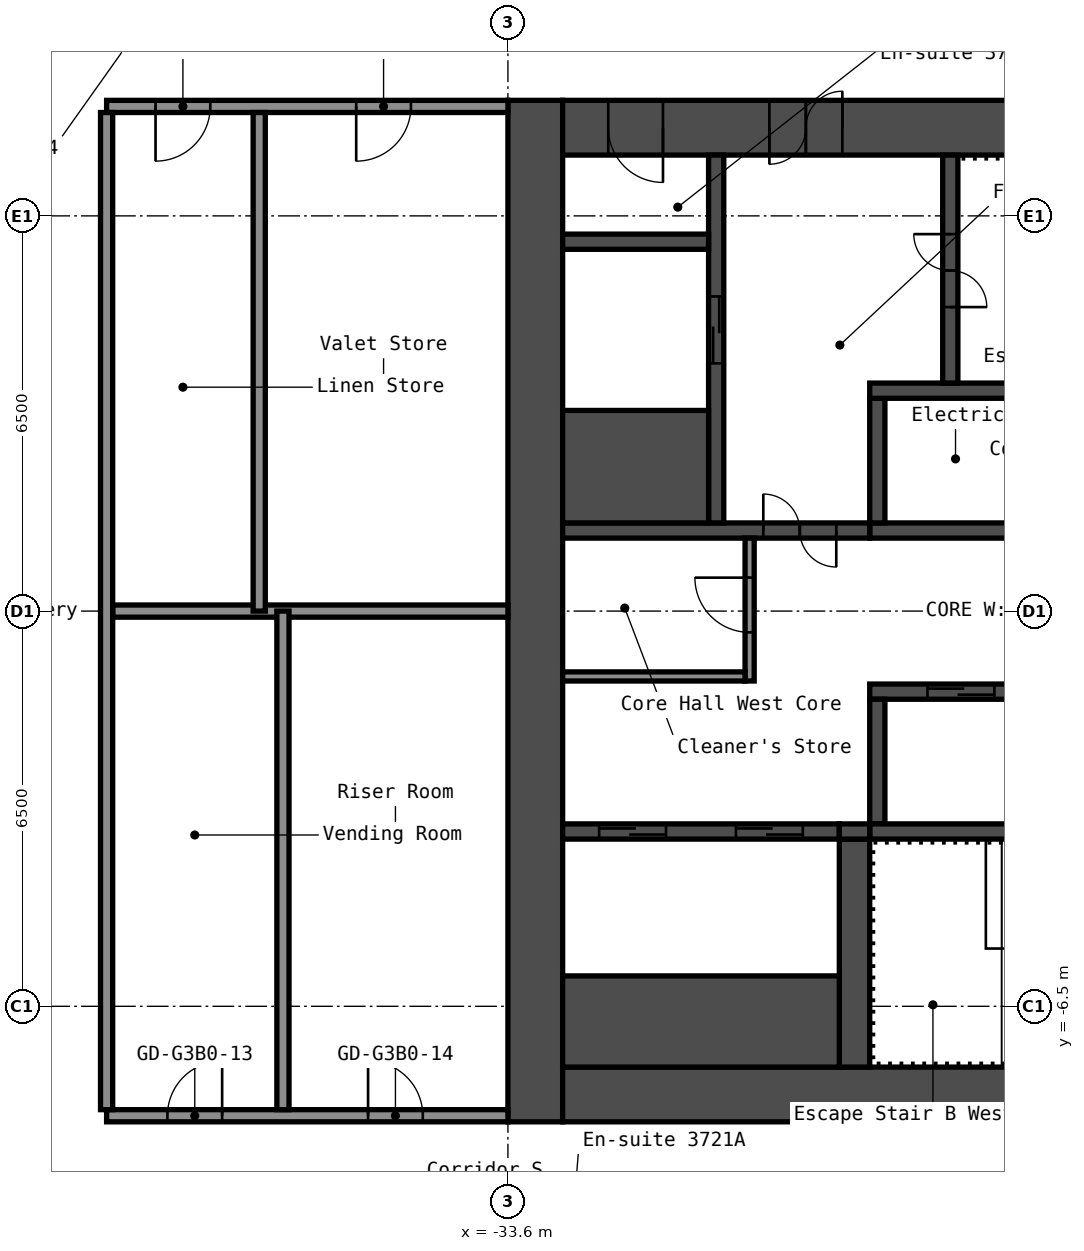
"""IFC4 building model, lengths in metres.
Left out: names, types, materials, properties, quantities, classifications, styles, units other than length and angle.
Written with IfcOpenShell. Run it as: python <this file> out.ifc"""

import sys

from ifc_helpers import new_model, si_unit, direction, frame, frame_2d, origin, place, context, subcontext, project, spatial, rectangle, extrude, element, fill, save


model = new_model("IFC4")
c1 = context("Model", 3, precision=1e-05, world=origin(), true_north=direction((0.0, 1.0)))
c2 = subcontext(c1, "Body", "Model", "MODEL_VIEW")
j1 = project(units=[si_unit("LENGTHUNIT", "METRE"), si_unit("PLANEANGLEUNIT", "RADIAN")], contexts=[c1])
p1 = place(None, origin())
s1 = spatial("IfcSite", under=j1, at=p1, CompositionType="ELEMENT")
p2 = place(p1, origin())
s2 = spatial("IfcBuilding", under=s1, at=p2, CompositionType="ELEMENT")
p3 = place(p2, frame((0.0, 0.0, 134.2)))
s3 = spatial("IfcBuildingStorey", under=s2, at=p3, CompositionType="ELEMENT", Elevation=134.2)
p4 = place(p3, frame((-33.15, -8.4, 0.0), z_axis=(0.0, 0.0, 1.0), x_axis=(0.0, 1.0, 0.0)))
e1 = element("IfcWall", 1, at=p4, inside=s3, PredefinedType="SHEAR", context=c2, shape_type="SweptSolid", body=[
    extrude(rectangle(XDim=16.8, YDim=0.9, at=frame_2d((8.4, 0.0))), origin(), (0.0, 0.0, 1.0), 2.75),
])
p5 = place(p3, frame((-32.7, 7.95, 0.0), z_axis=(0.0, 0.0, 1.0), x_axis=(1.0, 0.0, 0.0)))
e2 = element("IfcWall", 2, at=p5, inside=s3, PredefinedType="SHEAR", context=c2, shape_type="SweptSolid", body=[
    extrude(rectangle(XDim=15.0, YDim=0.9, at=frame_2d((7.5, 0.0))), origin(), (0.0, 0.0, 1.0), 2.75),
])
p6 = place(p5, frame((3.4, 0.0, 0.0)))
e3 = element("IfcOpeningElement", 3, at=p6, cuts=e2, PredefinedType="OPENING", context=c2, shape_type="SweptSolid", body=[
    extrude(rectangle(XDim=1.2, YDim=2.1, at=frame_2d((0.6, 1.05))), frame((0.0, 0.46, 0.0), z_axis=(0.0, -1.0, 0.0), x_axis=(1.0, 0.0, 0.0)), (0.0, 0.0, 1.0), 0.92),
])
p7 = place(p5, frame((0.75, 0.0, 0.0)))
e4 = element("IfcOpeningElement", 4, at=p7, cuts=e2, PredefinedType="OPENING", context=c2, shape_type="SweptSolid", body=[
    extrude(rectangle(XDim=0.9, YDim=2.1, at=frame_2d((0.45, 1.05))), frame((0.0, 0.46, 0.0), z_axis=(0.0, -1.0, 0.0), x_axis=(1.0, 0.0, 0.0)), (0.0, 0.0, 1.0), 0.92),
])
p8 = place(p3, frame((-32.7, -7.95, 0.0), z_axis=(0.0, 0.0, 1.0), x_axis=(1.0, 0.0, 0.0)))
e5 = element("IfcWall", 5, at=p8, inside=s3, PredefinedType="SHEAR", context=c2, shape_type="SweptSolid", body=[
    extrude(rectangle(XDim=15.0, YDim=0.9, at=frame_2d((7.5, 0.0))), origin(), (0.0, 0.0, 1.0), 2.75),
])
p9 = place(p8, frame((11.45, 0.0, 0.0)))
e6 = element("IfcOpeningElement", 6, at=p9, cuts=e5, PredefinedType="OPENING", context=c2, shape_type="SweptSolid", body=[
    extrude(rectangle(XDim=1.0, YDim=2.1, at=frame_2d((0.5, 1.05))), frame((0.0, 0.46, 0.0), z_axis=(0.0, -1.0, 0.0), x_axis=(1.0, 0.0, 0.0)), (0.0, 0.0, 1.0), 0.92),
])
p10 = place(p3, frame((-27.65, 1.325, 0.0), z_axis=(0.0, 0.0, 1.0), x_axis=(1.0, 0.0, 0.0)))
e7 = element("IfcWall", 7, at=p10, inside=s3, PredefinedType="SHEAR", context=c2, shape_type="SweptSolid", body=[
    extrude(rectangle(XDim=7.5, YDim=0.25, at=frame_2d((3.75, 0.0))), origin(), (0.0, 0.0, 1.0), 2.75),
])
p11 = place(p10, frame((3.425, 0.0, 0.0)))
e8 = element("IfcOpeningElement", 8, at=p11, cuts=e7, PredefinedType="OPENING", context=c2, shape_type="SweptSolid", body=[
    extrude(rectangle(XDim=0.9, YDim=2.1, at=frame_2d((0.45, 1.05))), frame((0.0, 0.135, 0.0), z_axis=(0.0, -1.0, 0.0), x_axis=(1.0, 0.0, 0.0)), (0.0, 0.0, 1.0), 0.27),
])
p12 = place(p3, frame((-27.525, 1.45, 0.0), z_axis=(0.0, 0.0, 1.0), x_axis=(0.0, 1.0, 0.0)))
e9 = element("IfcWall", 9, at=p12, inside=s3, PredefinedType="SHEAR", context=c2, shape_type="SweptSolid", body=[
    extrude(rectangle(XDim=2.05, YDim=0.25, at=frame_2d((1.025, 0.0))), origin(), (0.0, 0.0, 1.0), 2.75),
])
p13 = place(p3, frame((-27.65, 3.625, 0.0), z_axis=(0.0, 0.0, 1.0), x_axis=(1.0, 0.0, 0.0)))
e10 = element("IfcWall", 10, at=p13, inside=s3, PredefinedType="SHEAR", context=c2, shape_type="SweptSolid", body=[
    extrude(rectangle(XDim=7.5, YDim=0.25, at=frame_2d((3.75, 0.0))), origin(), (0.0, 0.0, 1.0), 2.75),
])
p14 = place(p3, frame((-26.325, 3.75, 0.0), z_axis=(0.0, 0.0, 1.0), x_axis=(0.0, 1.0, 0.0)))
e11 = element("IfcWall", 11, at=p14, inside=s3, PredefinedType="SHEAR", context=c2, shape_type="SweptSolid", body=[
    extrude(rectangle(XDim=3.75, YDim=0.25, at=frame_2d((1.875, 0.0))), origin(), (0.0, 0.0, 1.0), 2.75),
])
p15 = place(p14, frame((1.25, 0.0, 0.0)))
e12 = element("IfcOpeningElement", 12, at=p15, cuts=e11, PredefinedType="OPENING", context=c2, shape_type="SweptSolid", body=[
    extrude(rectangle(XDim=1.2, YDim=2.1, at=frame_2d((0.6, 1.05))), frame((0.0, 0.135, 0.0), z_axis=(0.0, -1.0, 0.0), x_axis=(1.0, 0.0, 0.0)), (0.0, 0.0, 1.0), 0.27),
])
p16 = place(p3, frame((-32.7, 1.325, 0.0), z_axis=(0.0, 0.0, 1.0), x_axis=(1.0, 0.0, 0.0)))
e13 = element("IfcWall", 13, at=p16, inside=s3, PredefinedType="SHEAR", context=c2, shape_type="SweptSolid", body=[
    extrude(rectangle(XDim=5.05, YDim=0.25, at=frame_2d((2.525, 0.0))), origin(), (0.0, 0.0, 1.0), 2.75),
])
p17 = place(p16, frame((3.3, 0.0, 0.0)))
e14 = element("IfcOpeningElement", 14, at=p17, cuts=e13, PredefinedType="OPENING", context=c2, shape_type="SweptSolid", body=[
    extrude(rectangle(XDim=1.2, YDim=2.1, at=frame_2d((0.6, 1.05))), frame((0.0, 0.135, 0.0), z_axis=(0.0, -1.0, 0.0), x_axis=(1.0, 0.0, 0.0)), (0.0, 0.0, 1.0), 0.27),
])
p18 = place(p3, frame((-30.175, 1.45, 0.0), z_axis=(0.0, 0.0, 1.0), x_axis=(0.0, 1.0, 0.0)))
e15 = element("IfcWall", 15, at=p18, inside=s3, PredefinedType="SHEAR", context=c2, shape_type="SweptSolid", body=[
    extrude(rectangle(XDim=6.05, YDim=0.25, at=frame_2d((3.025, 0.0))), origin(), (0.0, 0.0, 1.0), 2.75),
])
p19 = place(p18, frame((2.625, 0.0, 0.0)))
e16 = element("IfcOpeningElement", 16, at=p19, cuts=e15, PredefinedType="OPENING", context=c2, shape_type="SweptSolid", body=[
    extrude(rectangle(XDim=1.1, YDim=2.1, at=frame_2d((0.55, 1.05))), frame((0.0, 0.135, 0.0), z_axis=(0.0, -1.0, 0.0), x_axis=(1.0, 0.0, 0.0)), (0.0, 0.0, 1.0), 0.27),
])
p20 = place(p3, frame((-32.7, 2.375, 0.0), z_axis=(0.0, 0.0, 1.0), x_axis=(1.0, 0.0, 0.0)))
e17 = element("IfcWall", 17, at=p20, inside=s3, PredefinedType="SHEAR", context=c2, shape_type="SweptSolid", body=[
    extrude(rectangle(XDim=2.4, YDim=1.85, at=frame_2d((1.2, 0.0))), origin(), (0.0, 0.0, 1.0), 2.75),
])
p21 = place(p3, frame((-32.7, 6.075, 0.0), z_axis=(0.0, 0.0, 1.0), x_axis=(1.0, 0.0, 0.0)))
e18 = element("IfcWall", 18, at=p21, inside=s3, PredefinedType="SHEAR", context=c2, shape_type="SweptSolid", body=[
    extrude(rectangle(XDim=2.4, YDim=0.25, at=frame_2d((1.2, 0.0))), origin(), (0.0, 0.0, 1.0), 2.75),
])
p22 = place(p3, frame((-27.65, -1.325, 0.0), z_axis=(0.0, 0.0, 1.0), x_axis=(1.0, 0.0, 0.0)))
e19 = element("IfcWall", 19, at=p22, inside=s3, PredefinedType="SHEAR", context=c2, shape_type="SweptSolid", body=[
    extrude(rectangle(XDim=7.5, YDim=0.25, at=frame_2d((3.75, 0.0))), origin(), (0.0, 0.0, 1.0), 2.75),
])
p23 = place(p22, frame((5.75, 0.0, 0.0)))
e20 = element("IfcOpeningElement", 20, at=p23, cuts=e19, PredefinedType="OPENING", context=c2, shape_type="SweptSolid", body=[
    extrude(rectangle(XDim=1.1, YDim=2.1, at=frame_2d((0.55, 1.05))), frame((0.0, 0.135, 0.0), z_axis=(0.0, -1.0, 0.0), x_axis=(1.0, 0.0, 0.0)), (0.0, 0.0, 1.0), 0.27),
])
p24 = place(p22, frame((3.35, 0.0, 0.0)))
e21 = element("IfcOpeningElement", 21, at=p24, cuts=e19, PredefinedType="OPENING", context=c2, shape_type="SweptSolid", body=[
    extrude(rectangle(XDim=1.1, YDim=2.1, at=frame_2d((0.55, 1.05))), frame((0.0, 0.135, 0.0), z_axis=(0.0, -1.0, 0.0), x_axis=(1.0, 0.0, 0.0)), (0.0, 0.0, 1.0), 0.27),
])
p25 = place(p22, frame((0.95, 0.0, 0.0)))
e22 = element("IfcOpeningElement", 22, at=p25, cuts=e19, PredefinedType="OPENING", context=c2, shape_type="SweptSolid", body=[
    extrude(rectangle(XDim=1.1, YDim=2.1, at=frame_2d((0.55, 1.05))), frame((0.0, 0.135, 0.0), z_axis=(0.0, -1.0, 0.0), x_axis=(1.0, 0.0, 0.0)), (0.0, 0.0, 1.0), 0.27),
])
p26 = place(p3, frame((-27.525, -3.5, 0.0), z_axis=(0.0, 0.0, 1.0), x_axis=(0.0, 1.0, 0.0)))
e23 = element("IfcWall", 23, at=p26, inside=s3, PredefinedType="SHEAR", context=c2, shape_type="SweptSolid", body=[
    extrude(rectangle(XDim=2.05, YDim=0.25, at=frame_2d((1.025, 0.0))), origin(), (0.0, 0.0, 1.0), 2.75),
])
p27 = place(p3, frame((-27.65, -3.625, 0.0), z_axis=(0.0, 0.0, 1.0), x_axis=(1.0, 0.0, 0.0)))
e24 = element("IfcWall", 24, at=p27, inside=s3, PredefinedType="SHEAR", context=c2, shape_type="SweptSolid", body=[
    extrude(rectangle(XDim=7.5, YDim=0.25, at=frame_2d((3.75, 0.0))), origin(), (0.0, 0.0, 1.0), 2.75),
])
p28 = place(p3, frame((-27.9, -7.5, 0.0), z_axis=(0.0, 0.0, 1.0), x_axis=(0.0, 1.0, 0.0)))
e25 = element("IfcWall", 25, at=p28, inside=s3, PredefinedType="SHEAR", context=c2, shape_type="SweptSolid", body=[
    extrude(rectangle(XDim=3.75, YDim=0.5, at=frame_2d((1.875, 0.0))), origin(), (0.0, 0.0, 1.0), 2.75),
])
p29 = place(p3, frame((-32.7, -3.625, 0.0), z_axis=(0.0, 0.0, 1.0), x_axis=(1.0, 0.0, 0.0)))
e26 = element("IfcWall", 26, at=p29, inside=s3, PredefinedType="SHEAR", context=c2, shape_type="SweptSolid", body=[
    extrude(rectangle(XDim=4.55, YDim=0.25, at=frame_2d((2.275, 0.0))), origin(), (0.0, 0.0, 1.0), 2.75),
])
p30 = place(p29, frame((2.85, 0.0, 0.0)))
e27 = element("IfcOpeningElement", 27, at=p30, cuts=e26, PredefinedType="OPENING", context=c2, shape_type="SweptSolid", body=[
    extrude(rectangle(XDim=1.1, YDim=2.1, at=frame_2d((0.55, 1.05))), frame((0.0, 0.135, 0.0), z_axis=(0.0, -1.0, 0.0), x_axis=(1.0, 0.0, 0.0)), (0.0, 0.0, 1.0), 0.27),
])
p31 = place(p29, frame((0.6, 0.0, 0.0)))
e28 = element("IfcOpeningElement", 28, at=p31, cuts=e26, PredefinedType="OPENING", context=c2, shape_type="SweptSolid", body=[
    extrude(rectangle(XDim=1.1, YDim=2.1, at=frame_2d((0.55, 1.05))), frame((0.0, 0.135, 0.0), z_axis=(0.0, -1.0, 0.0), x_axis=(1.0, 0.0, 0.0)), (0.0, 0.0, 1.0), 0.27),
])
p32 = place(p3, frame((-32.7, -6.75, 0.0), z_axis=(0.0, 0.0, 1.0), x_axis=(1.0, 0.0, 0.0)))
e29 = element("IfcWall", 29, at=p32, inside=s3, PredefinedType="SHEAR", context=c2, shape_type="SweptSolid", body=[
    extrude(rectangle(XDim=4.55, YDim=1.5, at=frame_2d((2.275, 0.0))), origin(), (0.0, 0.0, 1.0), 2.75),
])
p33 = place(p3, frame((-28.15, -3.625, 0.0), z_axis=(0.0, 0.0, 1.0), x_axis=(1.0, 0.0, 0.0)))
e30 = element("IfcWall", 30, at=p33, inside=s3, PredefinedType="SHEAR", context=c2, shape_type="SweptSolid", body=[
    extrude(rectangle(XDim=0.5, YDim=0.25, at=frame_2d((0.25, 0.0))), origin(), (0.0, 0.0, 1.0), 2.75),
])
p34 = place(p3, frame((-29.625, -1.15, 0.0), z_axis=(0.0, 0.0, 1.0), x_axis=(0.0, 1.0, 0.0)))
e31 = element("IfcWall", 31, at=p34, inside=s3, PredefinedType="PARTITIONING", context=c2, shape_type="SweptSolid", body=[
    extrude(rectangle(XDim=2.35, YDim=0.15, at=frame_2d((1.175, 0.0))), origin(), (0.0, 0.0, 1.0), 2.75),
])
p35 = place(p34, frame((0.8, 0.0, 0.0)))
e32 = element("IfcOpeningElement", 32, at=p35, cuts=e31, PredefinedType="OPENING", context=c2, shape_type="SweptSolid", body=[
    extrude(rectangle(XDim=0.9, YDim=2.1, at=frame_2d((0.45, 1.05))), frame((0.0, 0.085, 0.0), z_axis=(0.0, -1.0, 0.0), x_axis=(1.0, 0.0, 0.0)), (0.0, 0.0, 1.0), 0.17),
])
p36 = place(p3, frame((-32.7, -1.075, 0.0), z_axis=(0.0, 0.0, 1.0), x_axis=(1.0, 0.0, 0.0)))
e33 = element("IfcWall", 33, at=p36, inside=s3, PredefinedType="PARTITIONING", context=c2, shape_type="SweptSolid", body=[
    extrude(rectangle(XDim=3.0, YDim=0.15, at=frame_2d((1.5, 0.0))), origin(), (0.0, 0.0, 1.0), 2.75),
])
p37 = place(p3, frame((-40.2, -8.3, 0.0), z_axis=(0.0, 0.0, 1.0), x_axis=(1.0, 0.0, 0.0)))
e34 = element("IfcWall", 34, at=p37, inside=s3, PredefinedType="PARTITIONING", context=c2, shape_type="SweptSolid", body=[
    extrude(rectangle(XDim=6.6, YDim=0.2, at=frame_2d((3.3, 0.0))), origin(), (0.0, 0.0, 1.0), 2.75),
])
p38 = place(p37, frame((1.0, 0.0, 0.0)))
e35 = element("IfcOpeningElement", 35, at=p38, cuts=e34, PredefinedType="OPENING", context=c2, shape_type="SweptSolid", body=[
    extrude(rectangle(XDim=0.9, YDim=2.1, at=frame_2d((0.45, 1.05))), frame((0.0, 0.11, 0.0), z_axis=(0.0, -1.0, 0.0), x_axis=(1.0, 0.0, 0.0)), (0.0, 0.0, 1.0), 0.22),
])
p39 = place(p37, frame((4.3, 0.0, 0.0)))
e36 = element("IfcOpeningElement", 36, at=p39, cuts=e34, PredefinedType="OPENING", context=c2, shape_type="SweptSolid", body=[
    extrude(rectangle(XDim=0.9, YDim=2.1, at=frame_2d((0.45, 1.05))), frame((0.0, 0.11, 0.0), z_axis=(0.0, -1.0, 0.0), x_axis=(1.0, 0.0, 0.0)), (0.0, 0.0, 1.0), 0.22),
])
p40 = place(p3, frame((-40.1, 0.0, 0.0), z_axis=(0.0, 0.0, 1.0), x_axis=(1.0, 0.0, 0.0)))
e37 = element("IfcWall", 37, at=p40, inside=s3, PredefinedType="PARTITIONING", context=c2, shape_type="SweptSolid", body=[
    extrude(rectangle(XDim=6.5, YDim=0.2, at=frame_2d((3.25, 0.0))), origin(), (0.0, 0.0, 1.0), 2.75),
])
p41 = place(p3, frame((-40.2, 8.3, 0.0), z_axis=(0.0, 0.0, 1.0), x_axis=(1.0, 0.0, 0.0)))
e38 = element("IfcWall", 38, at=p41, inside=s3, PredefinedType="PARTITIONING", context=c2, shape_type="SweptSolid", body=[
    extrude(rectangle(XDim=6.6, YDim=0.2, at=frame_2d((3.3, 0.0))), origin(), (0.0, 0.0, 1.0), 2.75),
])
p42 = place(p41, frame((0.805, 0.0, 0.0)))
e39 = element("IfcOpeningElement", 39, at=p42, cuts=e38, PredefinedType="OPENING", context=c2, shape_type="SweptSolid", body=[
    extrude(rectangle(XDim=0.9, YDim=2.1, at=frame_2d((0.45, 1.05))), frame((0.0, 0.11, 0.0), z_axis=(0.0, -1.0, 0.0), x_axis=(1.0, 0.0, 0.0)), (0.0, 0.0, 1.0), 0.22),
])
p43 = place(p41, frame((4.105, 0.0, 0.0)))
e40 = element("IfcOpeningElement", 40, at=p43, cuts=e38, PredefinedType="OPENING", context=c2, shape_type="SweptSolid", body=[
    extrude(rectangle(XDim=0.9, YDim=2.1, at=frame_2d((0.45, 1.05))), frame((0.0, 0.11, 0.0), z_axis=(0.0, -1.0, 0.0), x_axis=(1.0, 0.0, 0.0)), (0.0, 0.0, 1.0), 0.22),
])
p44 = place(p3, frame((-40.2, -8.2, 0.0), z_axis=(0.0, 0.0, 1.0), x_axis=(0.0, 1.0, 0.0)))
e41 = element("IfcWall", 41, at=p44, inside=s3, PredefinedType="PARTITIONING", context=c2, shape_type="SweptSolid", body=[
    extrude(rectangle(XDim=16.4, YDim=0.2, at=frame_2d((8.2, 0.0))), origin(), (0.0, 0.0, 1.0), 2.75),
])
for number, where, z_axis, x_axis in (
    (42, (-37.69, 0.0, 0.0), (0.0, 0.0, 1.0), (0.0, 1.0, 0.0)),
    (43, (-37.3, -8.2, 0.0), (0.0, 0.0, 1.0), (0.0, 1.0, 0.0)),
):
    element("IfcWall", number, at=place(p3, frame(where, z_axis=z_axis, x_axis=x_axis)), inside=s3, PredefinedType="PARTITIONING", context=c2, shape_type="SweptSolid", body=[
        extrude(rectangle(XDim=8.2, YDim=0.2, at=frame_2d((4.1, 0.0))), origin(), (0.0, 0.0, 1.0), 2.75),
    ])
p45 = place(p6, origin())
e44 = element("IfcDoor", 44, at=p45, inside=s3, OperationType="DOUBLE_DOOR_SINGLE_SWING", PredefinedType="DOOR", context=c2, shape_type="SweptSolid", body=[
    extrude(rectangle(XDim=1.2, YDim=2.1, at=frame_2d((0.6, 1.05))), frame((0.0, 0.025, 0.0), z_axis=(0.0, -1.0, 0.0), x_axis=(1.0, 0.0, 0.0)), (0.0, 0.0, 1.0), 0.05),
])
fill(e3, e44)
p46 = place(p7, origin())
e45 = element("IfcDoor", 45, at=p46, inside=s3, OperationType="SINGLE_SWING_RIGHT", PredefinedType="DOOR", context=c2, shape_type="SweptSolid", body=[
    extrude(rectangle(XDim=0.9, YDim=2.1, at=frame_2d((0.45, 1.05))), frame((0.0, 0.025, 0.0), z_axis=(0.0, -1.0, 0.0), x_axis=(1.0, 0.0, 0.0)), (0.0, 0.0, 1.0), 0.05),
])
fill(e4, e45)
p47 = place(p15, origin())
e46 = element("IfcDoor", 46, at=p47, inside=s3, OperationType="DOUBLE_DOOR_SINGLE_SWING", PredefinedType="DOOR", context=c2, shape_type="SweptSolid", body=[
    extrude(rectangle(XDim=1.2, YDim=2.1, at=frame_2d((0.6, 1.05))), frame((0.0, 0.025, 0.0), z_axis=(0.0, -1.0, 0.0), x_axis=(1.0, 0.0, 0.0)), (0.0, 0.0, 1.0), 0.05),
])
fill(e12, e46)
p48 = place(p17, origin())
e47 = element("IfcDoor", 47, at=p48, inside=s3, OperationType="DOUBLE_DOOR_SINGLE_SWING", PredefinedType="DOOR", context=c2, shape_type="SweptSolid", body=[
    extrude(rectangle(XDim=1.2, YDim=2.1, at=frame_2d((0.6, 1.05))), frame((0.0, 0.025, 0.0), z_axis=(0.0, -1.0, 0.0), x_axis=(1.0, 0.0, 0.0)), (0.0, 0.0, 1.0), 0.05),
])
fill(e14, e47)
p49 = place(p35, origin())
e48 = element("IfcDoor", 48, at=p49, inside=s3, OperationType="SINGLE_SWING_LEFT", PredefinedType="DOOR", context=c2, shape_type="SweptSolid", body=[
    extrude(rectangle(XDim=0.9, YDim=2.1, at=frame_2d((0.45, 1.05))), frame((0.0, 0.025, 0.0), z_axis=(0.0, -1.0, 0.0), x_axis=(1.0, 0.0, 0.0)), (0.0, 0.0, 1.0), 0.05),
])
fill(e32, e48)
p50 = place(p25, origin())
e49 = element("IfcDoor", 49, at=p50, inside=s3, OperationType="DOUBLE_DOOR_SLIDING", PredefinedType="DOOR", context=c2, shape_type="SweptSolid", body=[
    extrude(rectangle(XDim=1.1, YDim=2.1, at=frame_2d((0.55, 1.05))), frame((0.0, 0.025, 0.0), z_axis=(0.0, -1.0, 0.0), x_axis=(1.0, 0.0, 0.0)), (0.0, 0.0, 1.0), 0.05),
])
fill(e22, e49)
p51 = place(p19, origin())
e50 = element("IfcDoor", 50, at=p51, inside=s3, OperationType="DOUBLE_DOOR_SLIDING", PredefinedType="DOOR", context=c2, shape_type="SweptSolid", body=[
    extrude(rectangle(XDim=1.1, YDim=2.1, at=frame_2d((0.55, 1.05))), frame((0.0, 0.025, 0.0), z_axis=(0.0, -1.0, 0.0), x_axis=(1.0, 0.0, 0.0)), (0.0, 0.0, 1.0), 0.05),
])
fill(e16, e50)
p52 = place(p30, origin())
e51 = element("IfcDoor", 51, at=p52, inside=s3, OperationType="DOUBLE_DOOR_SLIDING", PredefinedType="DOOR", context=c2, shape_type="SweptSolid", body=[
    extrude(rectangle(XDim=1.1, YDim=2.1, at=frame_2d((0.55, 1.05))), frame((0.0, 0.025, 0.0), z_axis=(0.0, -1.0, 0.0), x_axis=(1.0, 0.0, 0.0)), (0.0, 0.0, 1.0), 0.05),
])
fill(e27, e51)
p53 = place(p31, origin())
e52 = element("IfcDoor", 52, at=p53, inside=s3, OperationType="DOUBLE_DOOR_SLIDING", PredefinedType="DOOR", context=c2, shape_type="SweptSolid", body=[
    extrude(rectangle(XDim=1.1, YDim=2.1, at=frame_2d((0.55, 1.05))), frame((0.0, 0.025, 0.0), z_axis=(0.0, -1.0, 0.0), x_axis=(1.0, 0.0, 0.0)), (0.0, 0.0, 1.0), 0.05),
])
fill(e28, e52)
p54 = place(p38, origin())
e53 = element("IfcDoor", 53, at=p54, inside=s3, OperationType="SINGLE_SWING_LEFT", PredefinedType="DOOR", context=c2, shape_type="SweptSolid", body=[
    extrude(rectangle(XDim=0.9, YDim=2.1, at=frame_2d((0.45, 1.05))), frame((0.0, 0.025, 0.0), z_axis=(0.0, -1.0, 0.0), x_axis=(1.0, 0.0, 0.0)), (0.0, 0.0, 1.0), 0.05),
])
fill(e35, e53)
p55 = place(p39, origin())
e54 = element("IfcDoor", 54, at=p55, inside=s3, OperationType="SINGLE_SWING_RIGHT", PredefinedType="DOOR", context=c2, shape_type="SweptSolid", body=[
    extrude(rectangle(XDim=0.9, YDim=2.1, at=frame_2d((0.45, 1.05))), frame((0.0, 0.025, 0.0), z_axis=(0.0, -1.0, 0.0), x_axis=(1.0, 0.0, 0.0)), (0.0, 0.0, 1.0), 0.05),
])
fill(e36, e54)
p56 = place(p42, origin())
e55 = element("IfcDoor", 55, at=p56, inside=s3, OperationType="SINGLE_SWING_LEFT", PredefinedType="DOOR", context=c2, shape_type="SweptSolid", body=[
    extrude(rectangle(XDim=0.9, YDim=2.1, at=frame_2d((0.45, 1.05))), frame((0.0, 0.025, 0.0), z_axis=(0.0, -1.0, 0.0), x_axis=(1.0, 0.0, 0.0)), (0.0, 0.0, 1.0), 0.05),
])
fill(e39, e55)
p57 = place(p43, origin())
e56 = element("IfcDoor", 56, at=p57, inside=s3, OperationType="SINGLE_SWING_LEFT", PredefinedType="DOOR", context=c2, shape_type="SweptSolid", body=[
    extrude(rectangle(XDim=0.9, YDim=2.1, at=frame_2d((0.45, 1.05))), frame((0.0, 0.025, 0.0), z_axis=(0.0, -1.0, 0.0), x_axis=(1.0, 0.0, 0.0)), (0.0, 0.0, 1.0), 0.05),
])
fill(e40, e56)
save(model, sys.argv[1])
